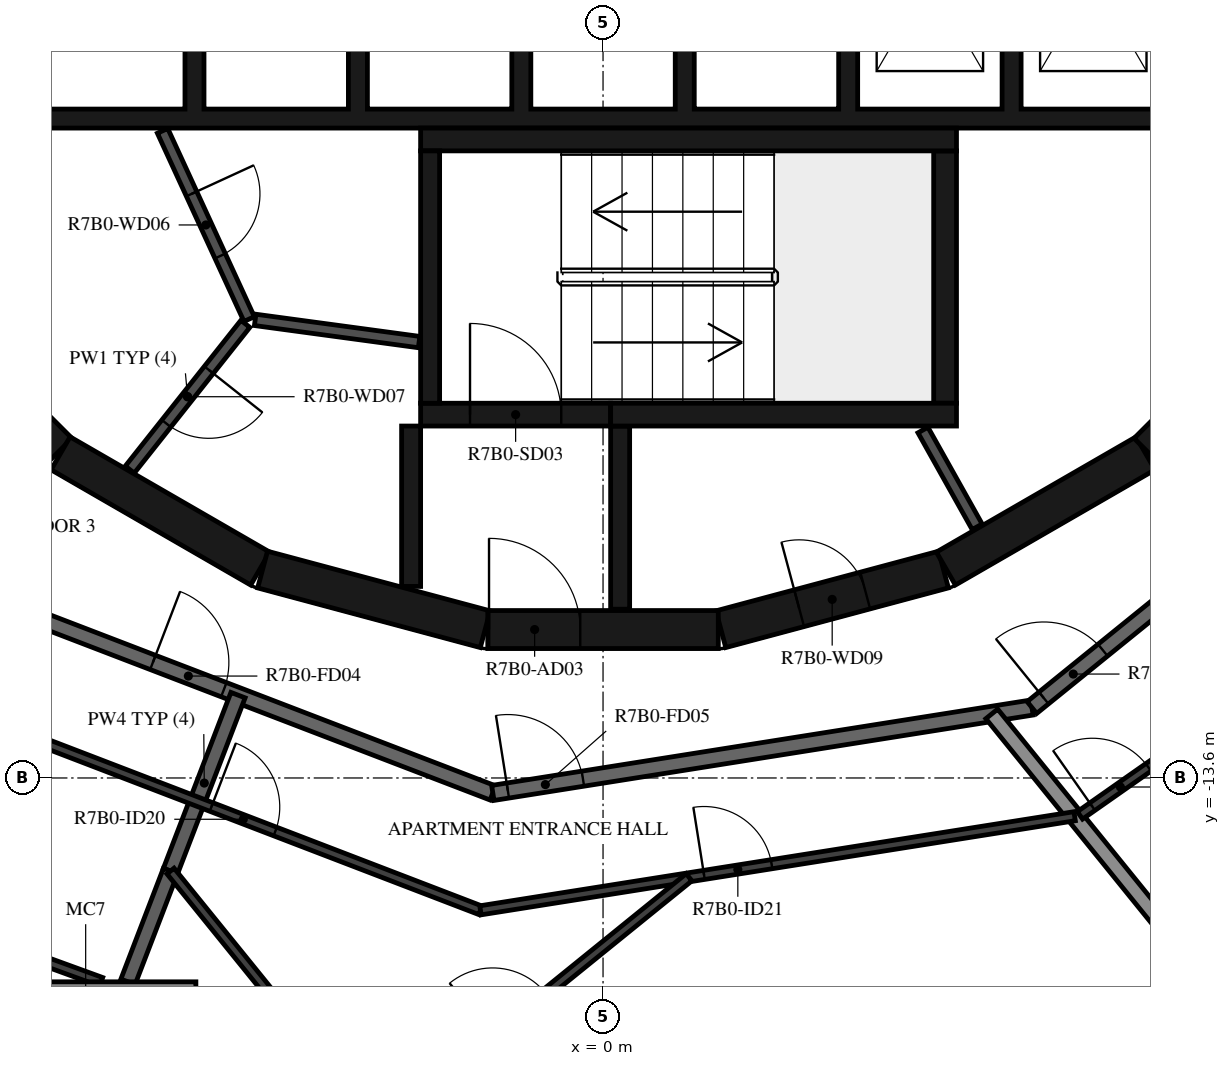
"""IFC4 building model, lengths in metres.
Left out: names, types, materials, properties, quantities, classifications, styles, units other than length and angle.
Written with IfcOpenShell. Run it as: python <this file> out.ifc"""

import sys

from ifc_helpers import new_model, si_unit, direction, frame, frame_2d, origin, place, context, subcontext, project, spatial, polyline, rectangle, outline, extrude, element, fill, save


model = new_model("IFC4")
c1 = context("Model", 3, precision=1e-05, world=origin(), true_north=direction((0.0, 1.0)))
c2 = subcontext(c1, "Body", "Model", "MODEL_VIEW")
j1 = project(units=[si_unit("LENGTHUNIT", "METRE"), si_unit("PLANEANGLEUNIT", "RADIAN")], contexts=[c1])
p1 = place(None, origin())
s1 = spatial("IfcSite", under=j1, at=p1, CompositionType="ELEMENT")
p2 = place(p1, origin())
s2 = spatial("IfcBuilding", under=s1, at=p2, CompositionType="ELEMENT")
p3 = place(p2, frame((0.0, 0.0, 277.4)))
s3 = spatial("IfcBuildingStorey", under=s2, at=p3, CompositionType="ELEMENT", Elevation=277.4)
p4 = place(p3, frame((1.55, -11.643, 0.0), z_axis=(0.0, 0.0, 1.0), x_axis=(0.965948410781, 0.258734743916, 0.0)))
e1 = element("IfcWall", 1, at=p4, inside=s3, PredefinedType="SHEAR", context=c2, shape_type="SweptSolid", body=[
    extrude(rectangle(XDim=3.033, YDim=0.5, at=frame_2d((1.516, 0.0))), origin(), (0.0, 0.0, 1.0), 3.12),
])
p5 = place(p4, frame((1.066, 0.0, 0.0)))
e2 = element("IfcOpeningElement", 2, at=p5, cuts=e1, PredefinedType="OPENING", context=c2, shape_type="SweptSolid", body=[
    extrude(rectangle(XDim=0.9, YDim=2.1, at=frame_2d((0.45, 1.05))), frame((0.0, 0.26, 0.0), z_axis=(0.0, -1.0, 0.0), x_axis=(1.0, 0.0, 0.0)), (0.0, 0.0, 1.0), 0.52),
])
p6 = place(p3, frame((4.51, -10.845, 0.0), z_axis=(0.0, 0.0, 1.0), x_axis=(0.865975092491, 0.500087131594, 0.0)))
e3 = element("IfcWall", 3, at=p6, inside=s3, PredefinedType="SHEAR", context=c2, shape_type="SweptSolid", body=[
    extrude(rectangle(XDim=3.033, YDim=0.5, at=frame_2d((1.516, 0.0))), origin(), (0.0, 0.0, 1.0), 3.12),
])
p7 = place(p3, frame((7.164, -9.308, 0.0), z_axis=(0.0, 0.0, 1.0), x_axis=(0.707106781187, 0.707106781187, 0.0)))
e4 = element("IfcWall", 4, at=p7, inside=s3, PredefinedType="SHEAR", context=c2, shape_type="SweptSolid", body=[
    extrude(rectangle(XDim=3.032, YDim=0.5, at=frame_2d((1.516, 0.0))), origin(), (0.0, 0.0, 1.0), 3.12),
])
p8 = place(p7, frame((1.066, 0.0, 0.0)))
e5 = element("IfcOpeningElement", 5, at=p8, cuts=e4, PredefinedType="OPENING", context=c2, shape_type="SweptSolid", body=[
    extrude(rectangle(XDim=0.9, YDim=2.1, at=frame_2d((0.45, 1.05))), frame((0.0, 0.26, 0.0), z_axis=(0.0, -1.0, 0.0), x_axis=(1.0, 0.0, 0.0)), (0.0, 0.0, 1.0), 0.52),
])
p9 = place(p3, frame((-9.308, -7.164, 0.0), z_axis=(0.0, 0.0, 1.0), x_axis=(0.707106781187, -0.707106781187, 0.0)))
e6 = element("IfcWall", 6, at=p9, inside=s3, PredefinedType="SHEAR", context=c2, shape_type="SweptSolid", body=[
    extrude(rectangle(XDim=3.032, YDim=0.5, at=frame_2d((1.516, 0.0))), origin(), (0.0, 0.0, 1.0), 3.12),
])
for number, where, z_axis, x_axis in (
    (7, (-7.137, -9.329, 0.0), (0.0, 0.0, 1.0), (0.866, -0.5, 0.0)),
    (8, (-4.479, -10.858, 0.0), (0.0, 0.0, 1.0), (0.966, -0.259, 0.0)),
):
    element("IfcWall", number, at=place(p3, frame(where, z_axis=z_axis, x_axis=x_axis)), inside=s3, PredefinedType="SHEAR", context=c2, shape_type="SweptSolid", body=[
        extrude(rectangle(XDim=3.033, YDim=0.5, at=frame_2d((1.516, 0.0))), origin(), (0.0, 0.0, 1.0), 3.12),
    ])
p10 = place(p3, frame((-1.516, -11.647, 0.0), z_axis=(0.0, 0.0, 1.0), x_axis=(1.0, 0.0, 0.0)))
e9 = element("IfcWall", 9, at=p10, inside=s3, PredefinedType="SHEAR", context=c2, shape_type="SweptSolid", body=[
    extrude(rectangle(XDim=3.033, YDim=0.5, at=frame_2d((1.516, 0.0))), origin(), (0.0, 0.0, 1.0), 3.12),
])
p11 = place(p10, frame((0.016, 0.0, 0.0)))
e10 = element("IfcOpeningElement", 10, at=p11, cuts=e9, PredefinedType="OPENING", context=c2, shape_type="SweptSolid", body=[
    extrude(rectangle(XDim=1.2, YDim=2.1, at=frame_2d((0.6, 1.05))), frame((0.0, 0.26, 0.0), z_axis=(0.0, -1.0, 0.0), x_axis=(1.0, 0.0, 0.0)), (0.0, 0.0, 1.0), 0.52),
])
p12 = place(p3, frame((-2.275, -8.67, 0.0), z_axis=(0.0, 0.0, 1.0), x_axis=(0.0, 1.0, 0.0)))
e11 = element("IfcWall", 11, at=p12, inside=s3, PredefinedType="SHEAR", context=c2, shape_type="SweptSolid", body=[
    extrude(rectangle(XDim=3.32, YDim=0.25, at=frame_2d((1.66, 0.0))), origin(), (0.0, 0.0, 1.0), 3.12),
])
p13 = place(p3, frame((-2.4, -5.2, 0.0), z_axis=(0.0, 0.0, 1.0), x_axis=(1.0, 0.0, 0.0)))
e12 = element("IfcWall", 12, at=p13, inside=s3, PredefinedType="SHEAR", context=c2, shape_type="SweptSolid", body=[
    extrude(rectangle(XDim=7.05, YDim=0.3, at=frame_2d((3.525, 0.0))), origin(), (0.0, 0.0, 1.0), 3.12),
])
p14 = place(p3, frame((4.5, -8.67, 0.0), z_axis=(0.0, 0.0, 1.0), x_axis=(0.0, 1.0, 0.0)))
e13 = element("IfcWall", 13, at=p14, inside=s3, PredefinedType="SHEAR", context=c2, shape_type="SweptSolid", body=[
    extrude(rectangle(XDim=3.32, YDim=0.3, at=frame_2d((1.66, 0.0))), origin(), (0.0, 0.0, 1.0), 3.12),
])
p15 = place(p3, frame((0.1, -8.82, 0.0), z_axis=(0.0, 0.0, 1.0), x_axis=(1.0, 0.0, 0.0)))
e14 = element("IfcWall", 14, at=p15, inside=s3, PredefinedType="SHEAR", context=c2, shape_type="SweptSolid", body=[
    extrude(rectangle(XDim=4.55, YDim=0.3, at=frame_2d((2.275, 0.0))), origin(), (0.0, 0.0, 1.0), 3.12),
])
p16 = place(p3, frame((-2.4, -8.82, 0.0), z_axis=(0.0, 0.0, 1.0), x_axis=(1.0, 0.0, 0.0)))
e15 = element("IfcWall", 15, at=p16, inside=s3, PredefinedType="SHEAR", context=c2, shape_type="SweptSolid", body=[
    extrude(rectangle(XDim=2.5, YDim=0.3, at=frame_2d((1.25, 0.0))), origin(), (0.0, 0.0, 1.0), 3.12),
])
p17 = place(p16, frame((0.65, 0.0, 0.0)))
e16 = element("IfcOpeningElement", 16, at=p17, cuts=e15, PredefinedType="OPENING", context=c2, shape_type="SweptSolid", body=[
    extrude(rectangle(XDim=1.2, YDim=2.1, at=frame_2d((0.6, 1.05))), frame((0.0, 0.16, 0.0), z_axis=(0.0, -1.0, 0.0), x_axis=(1.0, 0.0, 0.0)), (0.0, 0.0, 1.0), 0.32),
])
p18 = place(p3, frame((-2.525, -8.97, 0.0), z_axis=(0.0, 0.0, 1.0), x_axis=(0.0, -1.0, 0.0)))
e17 = element("IfcWall", 17, at=p18, inside=s3, PredefinedType="SHEAR", context=c2, shape_type="SweptSolid", body=[
    extrude(rectangle(XDim=2.11, YDim=0.25, at=frame_2d((1.055, 0.0))), origin(), (0.0, 0.0, 1.0), 3.12),
])
p19 = place(p3, frame((0.225, -8.97, 0.0), z_axis=(0.0, 0.0, 1.0), x_axis=(0.0, -1.0, 0.0)))
e18 = element("IfcWall", 18, at=p19, inside=s3, PredefinedType="SHEAR", context=c2, shape_type="SweptSolid", body=[
    extrude(rectangle(XDim=2.41, YDim=0.25, at=frame_2d((1.205, 0.0))), origin(), (0.0, 0.0, 1.0), 3.12),
])
p20 = place(p3, origin())
e19 = element("IfcWall", 19, at=p20, inside=s3, PredefinedType="SHEAR", context=c2, shape_type="SweptSolid", body=[
    extrude(outline(polyline([(9.8, -5.05), (9.8, -4.8), (9.8, -1.9), (9.55, -1.9), (9.55, -4.8), (7.65, -4.8), (7.65, -1.9), (7.4, -1.9), (7.4, -4.8), (5.5, -4.8), (5.5, -1.9), (5.25, -1.9), (5.25, -4.8), (3.35, -4.8), (3.35, -1.9), (3.1, -1.9), (3.1, -4.8), (1.2, -4.8), (1.2, -1.9), (0.95, -1.9), (0.95, -4.8), (-0.95, -4.8), (-0.95, -1.9), (-1.2, -1.9), (-1.2, -4.8), (-3.1, -4.8), (-3.1, -1.9), (-3.35, -1.9), (-3.35, -4.8), (-5.25, -4.8), (-5.25, -1.9), (-5.5, -1.9), (-5.5, -4.8), (-9.55, -4.8), (-9.55, -1.9), (-9.8, -1.9), (-9.8, -4.8), (-9.8, -5.05), (9.8, -5.05)])), origin(), (0.0, 0.0, 1.0), 3.12),
])
p21 = place(p3, frame((4.922, -10.296, 0.0), z_axis=(0.0, 0.0, 1.0), x_axis=(-0.48860846254, 0.872503163509, 0.0)))
e20 = element("IfcWall", 20, at=p21, inside=s3, PredefinedType="PARTITIONING", context=c2, shape_type="SweptSolid", body=[
    extrude(rectangle(XDim=1.459, YDim=0.15, at=frame_2d((0.73, 0.0))), origin(), (0.0, 0.0, 1.0), 3.12),
])
p22 = place(p3, frame((-5.795, -5.086, 0.0), z_axis=(0.0, 0.0, 1.0), x_axis=(0.417887867606, -0.908498613157, 0.0)))
e21 = element("IfcWall", 21, at=p22, inside=s3, PredefinedType="PARTITIONING", context=c2, shape_type="SweptSolid", body=[
    extrude(rectangle(XDim=2.726, YDim=0.15, at=frame_2d((1.363, 0.0))), origin(), (0.0, 0.0, 1.0), 3.12),
])
p23 = place(p22, frame((0.913, 0.0, 0.0)))
e22 = element("IfcOpeningElement", 22, at=p23, cuts=e21, PredefinedType="OPENING", context=c2, shape_type="SweptSolid", body=[
    extrude(rectangle(XDim=0.9, YDim=2.1, at=frame_2d((0.45, 1.05))), frame((0.0, 0.085, 0.0), z_axis=(0.0, -1.0, 0.0), x_axis=(1.0, 0.0, 0.0)), (0.0, 0.0, 1.0), 0.17),
])
p24 = place(p3, frame((-4.706, -7.625, 0.0), z_axis=(0.0, 0.0, 1.0), x_axis=(-0.621392599334, -0.783499353856, 0.0)))
e23 = element("IfcWall", 23, at=p24, inside=s3, PredefinedType="PARTITIONING", context=c2, shape_type="SweptSolid", body=[
    extrude(rectangle(XDim=2.447, YDim=0.15, at=frame_2d((1.224, 0.0))), origin(), (0.0, 0.0, 1.0), 3.12),
])
p25 = place(p24, frame((0.774, 0.0, 0.0)))
e24 = element("IfcOpeningElement", 24, at=p25, cuts=e23, PredefinedType="OPENING", context=c2, shape_type="SweptSolid", body=[
    extrude(rectangle(XDim=0.9, YDim=2.1, at=frame_2d((0.45, 1.05))), frame((0.0, 0.085, 0.0), z_axis=(0.0, -1.0, 0.0), x_axis=(1.0, 0.0, 0.0)), (0.0, 0.0, 1.0), 0.17),
])
p26 = place(p3, frame((-2.42, -7.865, 0.0), z_axis=(0.0, 0.0, 1.0), x_axis=(-0.990972299108, 0.134066783362, 0.0)))
e25 = element("IfcWall", 25, at=p26, inside=s3, PredefinedType="PARTITIONING", context=c2, shape_type="SweptSolid", body=[
    extrude(rectangle(XDim=2.176, YDim=0.15, at=frame_2d((1.088, 0.0))), origin(), (0.0, 0.0, 1.0), 3.12),
])
p27 = place(p3, frame((-8.154, -11.223, 0.0), z_axis=(0.0, 0.0, 1.0), x_axis=(0.93359073609, -0.358341090983, 0.0)))
e26 = element("IfcWall", 26, at=p27, inside=s3, PredefinedType="STANDARD", context=c2, shape_type="SweptSolid", body=[
    extrude(rectangle(XDim=7.181, YDim=0.2, at=frame_2d((3.59, 0.0))), origin(), (0.0, 0.0, 1.0), 3.12),
])
p28 = place(p27, frame((2.39, 0.0, 0.0)))
e27 = element("IfcOpeningElement", 27, at=p28, cuts=e26, PredefinedType="OPENING", context=c2, shape_type="SweptSolid", body=[
    extrude(rectangle(XDim=1.0, YDim=2.1, at=frame_2d((0.5, 1.05))), frame((0.0, 0.11, 0.0), z_axis=(0.0, -1.0, 0.0), x_axis=(1.0, 0.0, 0.0)), (0.0, 0.0, 1.0), 0.22),
])
p29 = place(p3, frame((-1.45, -13.797, 0.0), z_axis=(0.0, 0.0, 1.0), x_axis=(0.987690361611, 0.156421704315, 0.0)))
e28 = element("IfcWall", 28, at=p29, inside=s3, PredefinedType="STANDARD", context=c2, shape_type="SweptSolid", body=[
    extrude(rectangle(XDim=7.181, YDim=0.2, at=frame_2d((3.591, 0.0))), origin(), (0.0, 0.0, 1.0), 3.12),
])
p30 = place(p29, frame((0.2, 0.0, 0.0)))
e29 = element("IfcOpeningElement", 29, at=p30, cuts=e28, PredefinedType="OPENING", context=c2, shape_type="SweptSolid", body=[
    extrude(rectangle(XDim=1.0, YDim=2.1, at=frame_2d((0.5, 1.05))), frame((0.0, 0.11, 0.0), z_axis=(0.0, -1.0, 0.0), x_axis=(1.0, 0.0, 0.0)), (0.0, 0.0, 1.0), 0.22),
])
p31 = place(p3, frame((5.643, -12.673, 0.0), z_axis=(0.0, 0.0, 1.0), x_axis=(0.777160148113, 0.629302871585, 0.0)))
e30 = element("IfcWall", 30, at=p31, inside=s3, PredefinedType="STANDARD", context=c2, shape_type="SweptSolid", body=[
    extrude(rectangle(XDim=7.181, YDim=0.2, at=frame_2d((3.59, 0.0))), origin(), (0.0, 0.0, 1.0), 3.12),
])
p32 = place(p31, frame((0.2, 0.0, 0.0)))
e31 = element("IfcOpeningElement", 31, at=p32, cuts=e30, PredefinedType="OPENING", context=c2, shape_type="SweptSolid", body=[
    extrude(rectangle(XDim=1.0, YDim=2.1, at=frame_2d((0.5, 1.05))), frame((0.0, 0.11, 0.0), z_axis=(0.0, -1.0, 0.0), x_axis=(1.0, 0.0, 0.0)), (0.0, 0.0, 1.0), 0.22),
])
p33 = place(p3, frame((-5.69, -14.824, 0.0), z_axis=(0.0, 0.0, 1.0), x_axis=(0.358345342952, 0.933589104041, 0.0)))
e32 = element("IfcWall", 32, at=p33, inside=s3, PredefinedType="STANDARD", context=c2, shape_type="SweptSolid", body=[
    extrude(rectangle(XDim=2.479, YDim=0.2, at=frame_2d((1.239, 0.0))), origin(), (0.0, 0.0, 1.0), 3.12),
])
p34 = place(p3, frame((-6.25, -16.282, 0.0), z_axis=(0.0, 0.0, 1.0), x_axis=(0.358360842469, 0.933583154617, 0.0)))
e33 = element("IfcWall", 33, at=p34, inside=s3, PredefinedType="STANDARD", context=c2, shape_type="SweptSolid", body=[
    extrude(rectangle(XDim=1.562, YDim=0.2, at=frame_2d((0.781, 0.0))), origin(), (0.0, 0.0, 1.0), 3.12),
])
p35 = place(p3, frame((7.861, -16.148, 0.0), z_axis=(0.0, 0.0, 1.0), x_axis=(-0.629330189513, 0.777138026716, 0.0)))
e34 = element("IfcWall", 34, at=p35, inside=s3, PredefinedType="STANDARD", context=c2, shape_type="SweptSolid", body=[
    extrude(rectangle(XDim=4.364, YDim=0.2, at=frame_2d((2.182, 0.0))), origin(), (0.0, 0.0, 1.0), 2.73),
])
p36 = place(p3, frame((-9.067, -12.479, 0.0), z_axis=(0.0, 0.0, 1.0), x_axis=(0.933579449035, -0.358370495911, 0.0)))
e35 = element("IfcWall", 35, at=p36, inside=s3, PredefinedType="PARTITIONING", context=c2, shape_type="SweptSolid", body=[
    extrude(rectangle(XDim=7.985, YDim=0.12, at=frame_2d((3.992, 0.0))), origin(), (0.0, 0.0, 1.0), 3.12),
])
p37 = place(p36, frame((4.192, 0.0, 0.0)))
e36 = element("IfcOpeningElement", 36, at=p37, cuts=e35, PredefinedType="OPENING", context=c2, shape_type="SweptSolid", body=[
    extrude(rectangle(XDim=0.9, YDim=2.1, at=frame_2d((0.45, 1.05))), frame((0.0, 0.07, 0.0), z_axis=(0.0, -1.0, 0.0), x_axis=(1.0, 0.0, 0.0)), (0.0, 0.0, 1.0), 0.14),
])
p38 = place(p3, frame((-10.071, -15.019, 0.0), z_axis=(0.0, 0.0, 1.0), x_axis=(0.939648507355, -0.34214131967, 0.0)))
e37 = element("IfcWall", 37, at=p38, inside=s3, PredefinedType="PARTITIONING", context=c2, shape_type="SweptSolid", body=[
    extrude(rectangle(XDim=3.691, YDim=0.12, at=frame_2d((1.846, 0.0))), origin(), (0.0, 0.0, 1.0), 3.12),
])
p39 = place(p38, frame((0.4, 0.0, 0.0)))
e38 = element("IfcOpeningElement", 38, at=p39, cuts=e37, PredefinedType="OPENING", context=c2, shape_type="SweptSolid", body=[
    extrude(rectangle(XDim=0.8, YDim=2.1, at=frame_2d((0.4, 1.05))), frame((0.0, 0.07, 0.0), z_axis=(0.0, -1.0, 0.0), x_axis=(1.0, 0.0, 0.0)), (0.0, 0.0, 1.0), 0.14),
])
p40 = place(p3, frame((-1.612, -15.341, 0.0), z_axis=(0.0, 0.0, 1.0), x_axis=(0.987687560018, 0.15643939333, 0.0)))
e39 = element("IfcWall", 39, at=p40, inside=s3, PredefinedType="PARTITIONING", context=c2, shape_type="SweptSolid", body=[
    extrude(rectangle(XDim=7.914, YDim=0.12, at=frame_2d((3.957, 0.0))), origin(), (0.0, 0.0, 1.0), 3.12),
])
p41 = place(p40, frame((2.978, 0.0, 0.0)))
e40 = element("IfcOpeningElement", 40, at=p41, cuts=e39, PredefinedType="OPENING", context=c2, shape_type="SweptSolid", body=[
    extrude(rectangle(XDim=0.9, YDim=2.1, at=frame_2d((0.45, 1.05))), frame((0.0, 0.07, 0.0), z_axis=(0.0, -1.0, 0.0), x_axis=(1.0, 0.0, 0.0)), (0.0, 0.0, 1.0), 0.14),
])
p42 = place(p3, frame((-4.809, -19.717, 0.0), z_axis=(0.0, 0.0, 1.0), x_axis=(0.777140730041, 0.629326851255, 0.0)))
e41 = element("IfcWall", 41, at=p42, inside=s3, PredefinedType="PARTITIONING", context=c2, shape_type="SweptSolid", body=[
    extrude(rectangle(XDim=7.644, YDim=0.12, at=frame_2d((3.822, 0.0))), origin(), (0.0, 0.0, 1.0), 3.12),
])
p43 = place(p42, frame((2.594, 0.0, 0.0)))
e42 = element("IfcOpeningElement", 42, at=p43, cuts=e41, PredefinedType="OPENING", context=c2, shape_type="SweptSolid", body=[
    extrude(rectangle(XDim=0.9, YDim=2.1, at=frame_2d((0.45, 1.05))), frame((0.0, 0.07, 0.0), z_axis=(0.0, -1.0, 0.0), x_axis=(1.0, 0.0, 0.0)), (0.0, 0.0, 1.0), 0.14),
])
p44 = place(p42, frame((0.3, 0.0, 0.0)))
e43 = element("IfcOpeningElement", 43, at=p44, cuts=e41, PredefinedType="OPENING", context=c2, shape_type="SweptSolid", body=[
    extrude(rectangle(XDim=0.8, YDim=2.1, at=frame_2d((0.4, 1.05))), frame((0.0, 0.07, 0.0), z_axis=(0.0, -1.0, 0.0), x_axis=(1.0, 0.0, 0.0)), (0.0, 0.0, 1.0), 0.14),
])
p45 = place(p42, frame((4.319, 0.0, 0.0)))
e44 = element("IfcOpeningElement", 44, at=p45, cuts=e41, PredefinedType="OPENING", context=c2, shape_type="SweptSolid", body=[
    extrude(rectangle(XDim=0.9, YDim=2.1, at=frame_2d((0.45, 1.05))), frame((0.0, 0.07, 0.0), z_axis=(0.0, -1.0, 0.0), x_axis=(1.0, 0.0, 0.0)), (0.0, 0.0, 1.0), 0.14),
])
p46 = place(p3, frame((-2.948, -18.21, 0.0), z_axis=(0.0, 0.0, 1.0), x_axis=(-0.629330389268, 0.777137864953, 0.0)))
e45 = element("IfcWall", 45, at=p46, inside=s3, PredefinedType="PARTITIONING", context=c2, shape_type="SweptSolid", body=[
    extrude(rectangle(XDim=4.357, YDim=0.12, at=frame_2d((2.179, 0.0))), origin(), (0.0, 0.0, 1.0), 3.12),
])
p47 = place(p3, frame((6.274, -14.092, 0.0), z_axis=(0.0, 0.0, 1.0), x_axis=(0.818755256003, 0.574142691992, 0.0)))
e46 = element("IfcWall", 46, at=p47, inside=s3, PredefinedType="PARTITIONING", context=c2, shape_type="SweptSolid", body=[
    extrude(rectangle(XDim=5.08, YDim=0.12, at=frame_2d((2.54, 0.0))), origin(), (0.0, 0.0, 1.0), 3.12),
])
p48 = place(p47, frame((0.2, 0.0, 0.0)))
e47 = element("IfcOpeningElement", 47, at=p48, cuts=e46, PredefinedType="OPENING", context=c2, shape_type="SweptSolid", body=[
    extrude(rectangle(XDim=0.9, YDim=2.1, at=frame_2d((0.45, 1.05))), frame((0.0, 0.07, 0.0), z_axis=(0.0, -1.0, 0.0), x_axis=(1.0, 0.0, 0.0)), (0.0, 0.0, 1.0), 0.14),
])
p49 = place(p3, origin())
e48 = element("IfcWall", 48, at=p49, inside=s3, PredefinedType="STANDARD", context=c2, shape_type="SweptSolid", body=[
    extrude(outline(polyline([(-5.357, -16.282), (-5.357, -19.182), (-8.257, -19.182), (-8.257, -16.282), (-5.357, -16.282)]), holes=[polyline([(-8.057, -18.982), (-5.557, -18.982), (-5.557, -16.482), (-8.057, -16.482), (-8.057, -18.982)])]), origin(), (0.0, 0.0, 1.0), 3.12),
])
p50 = place(p17, origin())
e49 = element("IfcDoor", 49, at=p50, inside=s3, OperationType="SINGLE_SWING_LEFT", PredefinedType="DOOR", context=c2, shape_type="SweptSolid", body=[
    extrude(rectangle(XDim=1.2, YDim=2.1, at=frame_2d((0.6, 1.05))), frame((0.0, 0.025, 0.0), z_axis=(0.0, -1.0, 0.0), x_axis=(1.0, 0.0, 0.0)), (0.0, 0.0, 1.0), 0.05),
])
fill(e16, e49)
p51 = place(p11, origin())
e50 = element("IfcDoor", 50, at=p51, inside=s3, OperationType="SINGLE_SWING_RIGHT", PredefinedType="DOOR", context=c2, shape_type="SweptSolid", body=[
    extrude(rectangle(XDim=1.2, YDim=2.1, at=frame_2d((0.6, 1.05))), frame((0.0, 0.025, 0.0), z_axis=(0.0, -1.0, 0.0), x_axis=(1.0, 0.0, 0.0)), (0.0, 0.0, 1.0), 0.05),
])
fill(e10, e50)
p52 = place(p23, origin())
e51 = element("IfcDoor", 51, at=p52, inside=s3, OperationType="SINGLE_SWING_RIGHT", PredefinedType="DOOR", context=c2, shape_type="SweptSolid", body=[
    extrude(rectangle(XDim=0.9, YDim=2.1, at=frame_2d((0.45, 1.05))), frame((0.0, 0.025, 0.0), z_axis=(0.0, -1.0, 0.0), x_axis=(1.0, 0.0, 0.0)), (0.0, 0.0, 1.0), 0.05),
])
fill(e22, e51)
p53 = place(p25, origin())
e52 = element("IfcDoor", 52, at=p53, inside=s3, OperationType="SINGLE_SWING_LEFT", PredefinedType="DOOR", context=c2, shape_type="SweptSolid", body=[
    extrude(rectangle(XDim=0.9, YDim=2.1, at=frame_2d((0.45, 1.05))), frame((0.0, 0.025, 0.0), z_axis=(0.0, -1.0, 0.0), x_axis=(1.0, 0.0, 0.0)), (0.0, 0.0, 1.0), 0.05),
])
fill(e24, e52)
p54 = place(p5, origin())
e53 = element("IfcDoor", 53, at=p54, inside=s3, OperationType="SINGLE_SWING_LEFT", PredefinedType="DOOR", context=c2, shape_type="SweptSolid", body=[
    extrude(rectangle(XDim=0.9, YDim=2.1, at=frame_2d((0.45, 1.05))), frame((0.0, 0.025, 0.0), z_axis=(0.0, -1.0, 0.0), x_axis=(1.0, 0.0, 0.0)), (0.0, 0.0, 1.0), 0.05),
])
fill(e2, e53)
p55 = place(p28, origin())
e54 = element("IfcDoor", 54, at=p55, inside=s3, OperationType="SINGLE_SWING_RIGHT", PredefinedType="DOOR", context=c2, shape_type="SweptSolid", body=[
    extrude(rectangle(XDim=1.0, YDim=2.1, at=frame_2d((0.5, 1.05))), frame((0.0, 0.025, 0.0), z_axis=(0.0, -1.0, 0.0), x_axis=(1.0, 0.0, 0.0)), (0.0, 0.0, 1.0), 0.05),
])
fill(e27, e54)
p56 = place(p30, origin())
e55 = element("IfcDoor", 55, at=p56, inside=s3, OperationType="SINGLE_SWING_LEFT", PredefinedType="DOOR", context=c2, shape_type="SweptSolid", body=[
    extrude(rectangle(XDim=1.0, YDim=2.1, at=frame_2d((0.5, 1.05))), frame((0.0, 0.025, 0.0), z_axis=(0.0, -1.0, 0.0), x_axis=(1.0, 0.0, 0.0)), (0.0, 0.0, 1.0), 0.05),
])
fill(e29, e55)
p57 = place(p37, origin())
e56 = element("IfcDoor", 56, at=p57, inside=s3, OperationType="SINGLE_SWING_RIGHT", PredefinedType="DOOR", context=c2, shape_type="SweptSolid", body=[
    extrude(rectangle(XDim=0.9, YDim=2.1, at=frame_2d((0.45, 1.05))), frame((0.0, 0.025, 0.0), z_axis=(0.0, -1.0, 0.0), x_axis=(1.0, 0.0, 0.0)), (0.0, 0.0, 1.0), 0.05),
])
fill(e36, e56)
p58 = place(p41, origin())
e57 = element("IfcDoor", 57, at=p58, inside=s3, OperationType="SINGLE_SWING_LEFT", PredefinedType="DOOR", context=c2, shape_type="SweptSolid", body=[
    extrude(rectangle(XDim=0.9, YDim=2.1, at=frame_2d((0.45, 1.05))), frame((0.0, 0.025, 0.0), z_axis=(0.0, -1.0, 0.0), x_axis=(1.0, 0.0, 0.0)), (0.0, 0.0, 1.0), 0.05),
])
fill(e40, e57)
p59 = place(p32, origin())
e58 = element("IfcDoor", 58, at=p59, inside=s3, OperationType="SINGLE_SWING_LEFT", PredefinedType="DOOR", context=c2, shape_type="SweptSolid", body=[
    extrude(rectangle(XDim=1.0, YDim=2.1, at=frame_2d((0.5, 1.05))), frame((0.0, 0.025, 0.0), z_axis=(0.0, -1.0, 0.0), x_axis=(1.0, 0.0, 0.0)), (0.0, 0.0, 1.0), 0.05),
])
fill(e31, e58)
p60 = place(p48, origin())
e59 = element("IfcDoor", 59, at=p60, inside=s3, OperationType="SINGLE_SWING_LEFT", PredefinedType="DOOR", context=c2, shape_type="SweptSolid", body=[
    extrude(rectangle(XDim=0.9, YDim=2.1, at=frame_2d((0.45, 1.05))), frame((0.0, 0.025, 0.0), z_axis=(0.0, -1.0, 0.0), x_axis=(1.0, 0.0, 0.0)), (0.0, 0.0, 1.0), 0.05),
])
fill(e47, e59)
save(model, sys.argv[1])
